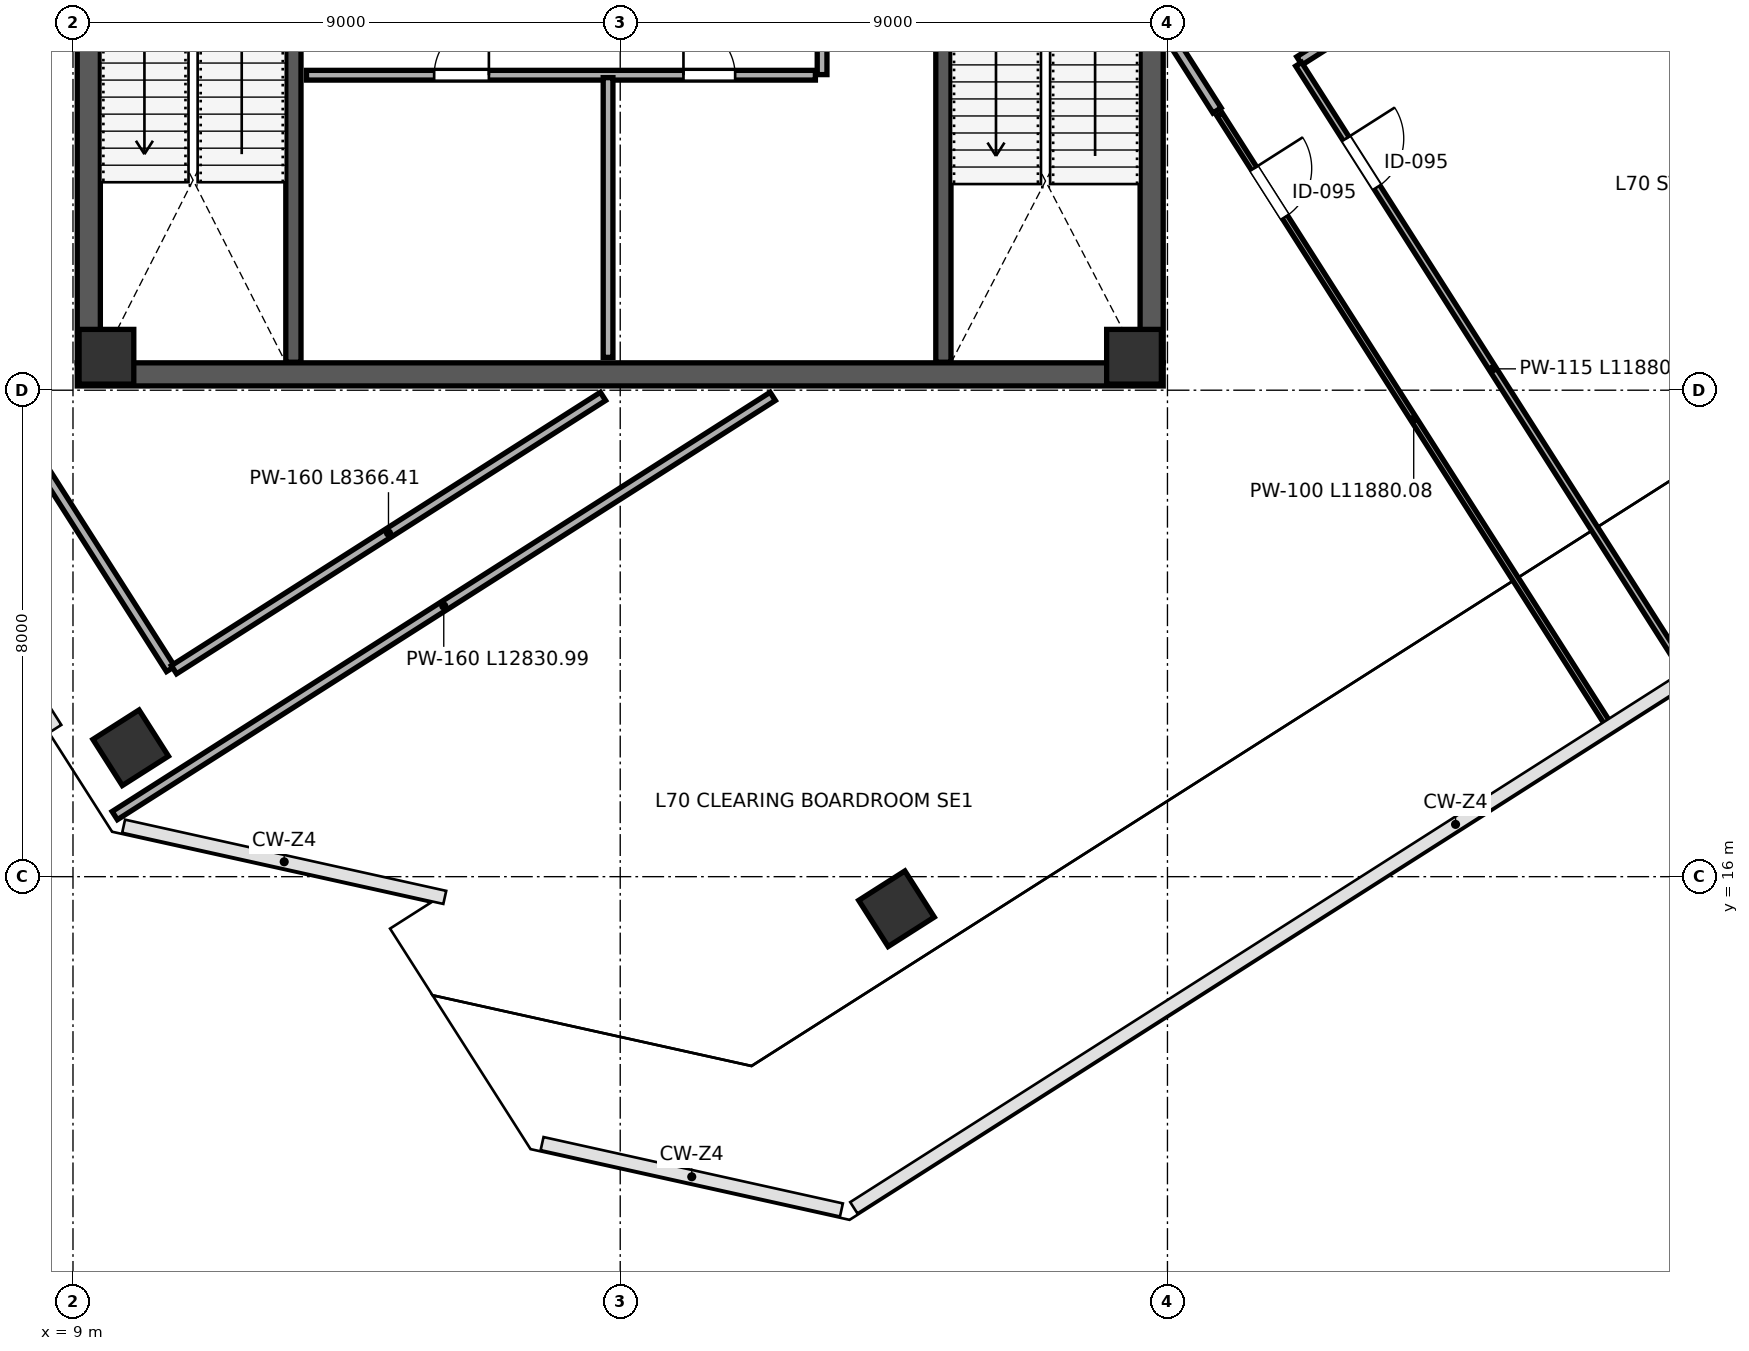
"""IFC4 building model, lengths in metres.
Left out: names, types, materials, properties, quantities, classifications, styles, units other than length and angle.
Written with IfcOpenShell. Run it as: python <this file> out.ifc"""

import sys

from ifc_helpers import new_model, si_unit, direction, frame, frame_2d, origin, origin_2d, place, context, subcontext, project, spatial, rectangle, extrude, source, transform, mapped, element, fill, save


model = new_model("IFC4")
c1 = context("Model", 3, precision=1e-05, world=origin(), true_north=direction((0.0, 1.0)))
c2 = subcontext(c1, "Body", "Model", "MODEL_VIEW")
j1 = project(units=[si_unit("LENGTHUNIT", "METRE"), si_unit("PLANEANGLEUNIT", "RADIAN")], contexts=[c1])
p1 = place(None, origin())
s1 = spatial("IfcSite", under=j1, at=p1, CompositionType="ELEMENT")
p2 = place(p1, origin())
s2 = spatial("IfcBuilding", under=s1, at=p2, CompositionType="ELEMENT")
p3 = place(p2, frame((0.0, 0.0, 311.4)))
s3 = spatial("IfcBuildingStorey", under=s2, at=p3, CompositionType="ELEMENT", Elevation=311.4)
m1 = source(origin(), c2, "Body", "SweptSolid", [
    extrude(rectangle(XDim=0.9, YDim=0.9, at=origin_2d()), origin(), (0.0, 0.0, 1.0), 4.199),
])
for number, where, z_axis, x_axis in (
    (1, (9.55, 24.55, 0.001), (0.0, 0.0, 1.0), (1.0, 0.0, 0.0)),
    (2, (26.45, 24.55, 0.001), (0.0, 0.0, 1.0), (1.0, 0.0, 0.0)),
):
    element("IfcColumn", number, at=place(p3, frame(where, z_axis=z_axis, x_axis=x_axis)), inside=s3, PredefinedType="COLUMN", context=c2, shape_type="MappedRepresentation", body=[
        mapped(m1, transform((0.0, 0.0, 0.0), scale=1.0)),
    ])
m2 = source(origin(), c2, "Body", "SweptSolid", [
    extrude(rectangle(XDim=0.9, YDim=0.9, at=origin_2d()), origin(), (0.0, 0.0, 1.0), 4.199),
])
for number, where, z_axis, x_axis in (
    (3, (9.949, 18.12, 0.001), (0.0, 0.0, 1.0), (-0.537, 0.843, 0.0)),
    (4, (22.544, 15.472, 0.001), (0.0, 0.0, 1.0), (-0.537, 0.843, 0.0)),
):
    element("IfcColumn", number, at=place(p3, frame(where, z_axis=z_axis, x_axis=x_axis)), inside=s3, PredefinedType="COLUMN", context=c2, shape_type="MappedRepresentation", body=[
        mapped(m2, transform((0.0, 0.0, 0.0), scale=1.0)),
    ])
p4 = place(p3, frame((9.26, 24.45, 0.0), z_axis=(0.0, 0.0, 1.0), x_axis=(0.0, 1.0, 0.0)))
e5 = element("IfcWall", 5, at=p4, inside=s3, PredefinedType="SHEAR", context=c2, shape_type="SweptSolid", body=[
    extrude(rectangle(XDim=15.1, YDim=0.38, at=frame_2d((7.55, 0.0))), origin(), (0.0, 0.0, 1.0), 3.96),
])
p5 = place(p4, frame((8.7, 0.0, 0.0)))
e6 = element("IfcOpeningElement", 6, at=p5, cuts=e5, PredefinedType="OPENING", context=c2, shape_type="SweptSolid", body=[
    extrude(rectangle(XDim=1.15, YDim=2.2, at=frame_2d((0.575, 1.1))), frame((0.0, 0.2, 0.0), z_axis=(0.0, -1.0, 0.0), x_axis=(1.0, 0.0, 0.0)), (0.0, 0.0, 1.0), 0.4),
])
p6 = place(p3, frame((26.74, 24.45, 0.0), z_axis=(0.0, 0.0, 1.0), x_axis=(0.0, 1.0, 0.0)))
e7 = element("IfcWall", 7, at=p6, inside=s3, PredefinedType="SHEAR", context=c2, shape_type="SweptSolid", body=[
    extrude(rectangle(XDim=15.1, YDim=0.38, at=frame_2d((7.55, 0.0))), origin(), (0.0, 0.0, 1.0), 3.96),
])
p7 = place(p6, frame((8.6, 0.0, 0.0)))
e8 = element("IfcOpeningElement", 8, at=p7, cuts=e7, PredefinedType="OPENING", context=c2, shape_type="SweptSolid", body=[
    extrude(rectangle(XDim=1.15, YDim=2.2, at=frame_2d((0.575, 1.1))), frame((0.0, 0.2, 0.0), z_axis=(0.0, -1.0, 0.0), x_axis=(1.0, 0.0, 0.0)), (0.0, 0.0, 1.0), 0.4),
])
p8 = place(p3, frame((9.07, 24.26, 0.0), z_axis=(0.0, 0.0, 1.0), x_axis=(1.0, 0.0, 0.0)))
e9 = element("IfcWall", 9, at=p8, inside=s3, PredefinedType="SHEAR", context=c2, shape_type="SweptSolid", body=[
    extrude(rectangle(XDim=17.86, YDim=0.38, at=frame_2d((8.93, 0.0))), origin(), (0.0, 0.0, 1.0), 3.96),
])
p9 = place(p3, frame((12.625, 24.46, 0.0), z_axis=(0.0, 0.0, 1.0), x_axis=(0.0, 1.0, 0.0)))
e10 = element("IfcWall", 10, at=p9, inside=s3, PredefinedType="SHEAR", context=c2, shape_type="SweptSolid", body=[
    extrude(rectangle(XDim=7.49, YDim=0.25, at=frame_2d((3.745, 0.0))), origin(), (0.0, 0.0, 1.0), 3.96),
])
p10 = place(p9, frame((5.85, 0.0, 0.0)))
e11 = element("IfcOpeningElement", 11, at=p10, cuts=e10, PredefinedType="OPENING", context=c2, shape_type="SweptSolid", body=[
    extrude(rectangle(XDim=1.15, YDim=2.2, at=frame_2d((0.575, 1.1))), frame((0.0, 0.135, 0.0), z_axis=(0.0, -1.0, 0.0), x_axis=(1.0, 0.0, 0.0)), (0.0, 0.0, 1.0), 0.27),
])
p11 = place(p3, frame((23.315, 24.46, 0.0), z_axis=(0.0, 0.0, 1.0), x_axis=(0.0, 1.0, 0.0)))
e12 = element("IfcWall", 12, at=p11, inside=s3, PredefinedType="SHEAR", context=c2, shape_type="SweptSolid", body=[
    extrude(rectangle(XDim=7.49, YDim=0.25, at=frame_2d((3.745, 0.0))), origin(), (0.0, 0.0, 1.0), 3.96),
])
p12 = place(p3, frame((12.84, 29.18, 0.0), z_axis=(0.0, 0.0, 1.0), x_axis=(1.0, 0.0, 0.0)))
e13 = element("IfcWall", 13, at=p12, inside=s3, PredefinedType="PARTITIONING", context=c2, shape_type="SweptSolid", body=[
    extrude(rectangle(XDim=8.37, YDim=0.16, at=frame_2d((4.185, 0.0))), origin(), (0.0, 0.0, 1.0), 3.96),
])
p13 = place(p12, frame((2.1, 0.0, 0.0)))
e14 = element("IfcOpeningElement", 14, at=p13, cuts=e13, PredefinedType="OPENING", context=c2, shape_type="SweptSolid", body=[
    extrude(rectangle(XDim=0.9, YDim=2.15, at=frame_2d((0.45, 1.075))), frame((0.0, 0.09, 0.0), z_axis=(0.0, -1.0, 0.0), x_axis=(1.0, 0.0, 0.0)), (0.0, 0.0, 1.0), 0.18),
])
p14 = place(p12, frame((6.2, 0.0, 0.0)))
e15 = element("IfcOpeningElement", 15, at=p14, cuts=e13, PredefinedType="OPENING", context=c2, shape_type="SweptSolid", body=[
    extrude(rectangle(XDim=0.85, YDim=2.1, at=frame_2d((0.425, 1.05))), frame((0.0, 0.09, 0.0), z_axis=(0.0, -1.0, 0.0), x_axis=(1.0, 0.0, 0.0)), (0.0, 0.0, 1.0), 0.18),
])
p15 = place(p3, frame((17.8, 24.54, 0.0), z_axis=(0.0, 0.0, 1.0), x_axis=(0.0, 1.0, 0.0)))
e16 = element("IfcWall", 16, at=p15, inside=s3, PredefinedType="PARTITIONING", context=c2, shape_type="SweptSolid", body=[
    extrude(rectangle(XDim=4.6, YDim=0.16, at=frame_2d((2.3, 0.0))), origin(), (0.0, 0.0, 1.0), 3.96),
])
p16 = place(p3, frame((21.32, 29.19, 0.0), z_axis=(0.0, 0.0, 1.0), x_axis=(0.0, 1.0, 0.0)))
e17 = element("IfcWall", 17, at=p16, inside=s3, PredefinedType="PARTITIONING", context=c2, shape_type="SweptSolid", body=[
    extrude(rectangle(XDim=2.92, YDim=0.16, at=frame_2d((1.46, 0.0))), origin(), (0.0, 0.0, 1.0), 3.96),
])
p17 = place(p3, frame((3.26, 30.945, 0.0), z_axis=(0.0, 0.0, 1.0), x_axis=(0.537307625317, -0.843386338386, 0.0)))
e18 = element("IfcWall", 18, at=p17, inside=s3, PredefinedType="PARTITIONING", context=c2, shape_type="SweptSolid", body=[
    extrude(rectangle(XDim=13.67, YDim=0.16, at=frame_2d((6.835, 0.0))), origin(), (0.0, 0.0, 1.0), 3.96),
])
p18 = place(p17, frame((1.15, 0.0, 0.0)))
e19 = element("IfcOpeningElement", 19, at=p18, cuts=e18, PredefinedType="OPENING", context=c2, shape_type="SweptSolid", body=[
    extrude(rectangle(XDim=0.95, YDim=2.15, at=frame_2d((0.475, 1.075))), frame((0.0, 0.09, 0.0), z_axis=(0.0, -1.0, 0.0), x_axis=(1.0, 0.0, 0.0)), (0.0, 0.0, 1.0), 0.18),
])
p19 = place(p3, frame((10.661, 19.403, 0.0), z_axis=(0.0, 0.0, 1.0), x_axis=(0.843399441764, 0.537287057012, 0.0)))
e20 = element("IfcWall", 20, at=p19, inside=s3, PredefinedType="PARTITIONING", context=c2, shape_type="SweptSolid", body=[
    extrude(rectangle(XDim=8.366, YDim=0.16, at=frame_2d((4.183, 0.0))), origin(), (0.0, 0.0, 1.0), 3.96),
])
p20 = place(p3, frame((27.102, 29.721, 0.0), z_axis=(0.0, 0.0, 1.0), x_axis=(0.537279676557, -0.843404143432, 0.0)))
e21 = element("IfcWall", 21, at=p20, inside=s3, PredefinedType="PARTITIONING", context=c2, shape_type="SweptSolid", body=[
    extrude(rectangle(XDim=1.329, YDim=0.16, at=frame_2d((0.664, 0.0))), origin(), (0.0, 0.0, 1.0), 3.96),
])
p21 = place(p3, frame((29.169, 29.416, 0.0), z_axis=(0.0, 0.0, 1.0), x_axis=(0.843389386546, 0.537302840734, 0.0)))
e22 = element("IfcWall", 22, at=p21, inside=s3, PredefinedType="PARTITIONING", context=c2, shape_type="SweptSolid", body=[
    extrude(rectangle(XDim=10.94, YDim=0.16, at=frame_2d((5.47, 0.0))), origin(), (0.0, 0.0, 1.0), 3.96),
])
p22 = place(p3, frame((9.687, 17.004, 0.0), z_axis=(0.0, 0.0, 1.0), x_axis=(0.843392646996, 0.537297722862, 0.0)))
e23 = element("IfcWall", 23, at=p22, inside=s3, PredefinedType="PARTITIONING", context=c2, shape_type="SweptSolid", body=[
    extrude(rectangle(XDim=12.831, YDim=0.16, at=frame_2d((6.416, 0.0))), origin(), (0.0, 0.0, 1.0), 3.96),
])
p23 = place(p3, frame((29.157, 29.361, 0.0), z_axis=(0.0, 0.0, 1.0), x_axis=(0.537294294715, -0.843394830946, 0.0)))
e24 = element("IfcWall", 24, at=p23, inside=s3, PredefinedType="PARTITIONING", context=c2, shape_type="SweptSolid", body=[
    extrude(rectangle(XDim=11.88, YDim=0.115, at=frame_2d((5.94, 0.0))), origin(), (0.0, 0.0, 1.0), 3.253),
])
p24 = place(p23, frame((1.45, 0.0, 0.0)))
e25 = element("IfcOpeningElement", 25, at=p24, cuts=e24, PredefinedType="OPENING", context=c2, shape_type="SweptSolid", body=[
    extrude(rectangle(XDim=0.95, YDim=2.15, at=frame_2d((0.475, 1.075))), frame((0.0, 0.067, 0.0), z_axis=(0.0, -1.0, 0.0), x_axis=(1.0, 0.0, 0.0)), (0.0, 0.0, 1.0), 0.135),
])
p25 = place(p3, frame((27.858, 28.533, 0.0), z_axis=(0.0, 0.0, 1.0), x_axis=(0.537294294715, -0.843394830946, 0.0)))
e26 = element("IfcWall", 26, at=p25, inside=s3, PredefinedType="PARTITIONING", context=c2, shape_type="SweptSolid", body=[
    extrude(rectangle(XDim=11.88, YDim=0.1, at=frame_2d((5.94, 0.0))), origin(), (0.0, 0.0, 1.0), 3.253),
])
p26 = place(p25, frame((1.05, 0.0, 0.0)))
e27 = element("IfcOpeningElement", 27, at=p26, cuts=e26, PredefinedType="OPENING", context=c2, shape_type="SweptSolid", body=[
    extrude(rectangle(XDim=0.95, YDim=2.15, at=frame_2d((0.475, 1.075))), frame((0.0, 0.06, 0.0), z_axis=(0.0, -1.0, 0.0), x_axis=(1.0, 0.0, 0.0)), (0.0, 0.0, 1.0), 0.12),
])
m3 = source(origin(), c2, "Body", "SweptSolid", [
    extrude(rectangle(XDim=0.9, YDim=2.15, at=frame_2d((0.45, 1.075))), frame((0.0, 0.025, 0.0), z_axis=(0.0, -1.0, 0.0), x_axis=(1.0, 0.0, 0.0)), (0.0, 0.0, 1.0), 0.05),
])
p27 = place(p13, origin())
e28 = element("IfcDoor", 28, at=p27, inside=s3, OperationType="SINGLE_SWING_RIGHT", PredefinedType="DOOR", context=c2, shape_type="MappedRepresentation", body=[
    mapped(m3, transform((0.0, 0.0, 0.0), scale=1.0)),
])
fill(e14, e28)
m4 = source(origin(), c2, "Body", "SweptSolid", [
    extrude(rectangle(XDim=0.85, YDim=2.1, at=frame_2d((0.425, 1.05))), frame((0.0, 0.025, 0.0), z_axis=(0.0, -1.0, 0.0), x_axis=(1.0, 0.0, 0.0)), (0.0, 0.0, 1.0), 0.05),
])
p28 = place(p14, origin())
e29 = element("IfcDoor", 29, at=p28, inside=s3, OperationType="SINGLE_SWING_LEFT", PredefinedType="DOOR", context=c2, shape_type="MappedRepresentation", body=[
    mapped(m4, transform((0.0, 0.0, 0.0), scale=1.0)),
])
fill(e15, e29)
m5 = source(origin(), c2, "Body", "SweptSolid", [
    extrude(rectangle(XDim=0.95, YDim=2.15, at=frame_2d((0.475, 1.075))), frame((0.0, 0.025, 0.0), z_axis=(0.0, -1.0, 0.0), x_axis=(1.0, 0.0, 0.0)), (0.0, 0.0, 1.0), 0.05),
])
p29 = place(p24, origin())
e30 = element("IfcDoor", 30, at=p29, inside=s3, OperationType="SINGLE_SWING_LEFT", PredefinedType="DOOR", context=c2, shape_type="MappedRepresentation", body=[
    mapped(m5, transform((0.0, 0.0, 0.0), scale=1.0)),
])
fill(e25, e30)
p30 = place(p26, origin())
e31 = element("IfcDoor", 31, at=p30, inside=s3, OperationType="SINGLE_SWING_LEFT", PredefinedType="DOOR", context=c2, shape_type="MappedRepresentation", body=[
    mapped(m5, transform((0.0, 0.0, 0.0), scale=1.0)),
])
fill(e27, e31)
save(model, sys.argv[1])
